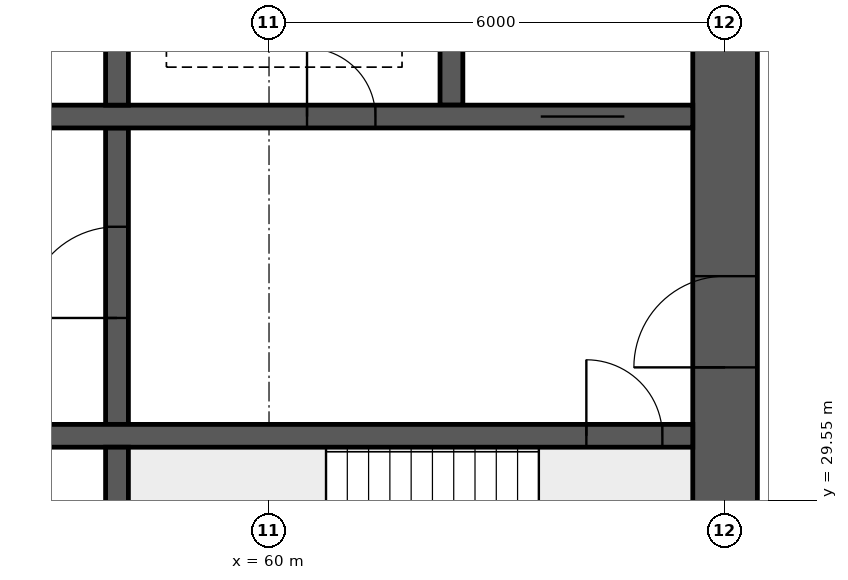
"""IFC4 building model, lengths in metres.
Left out: names, types, materials, properties, quantities, classifications, styles, units other than length and angle.
Written with IfcOpenShell. Run it as: python <this file> out.ifc"""

import sys

from ifc_helpers import new_model, si_unit, direction, frame, frame_2d, origin, place, context, subcontext, project, spatial, rectangle, extrude, element, fill, save


model = new_model("IFC4")
c1 = context("Model", 3, precision=1e-05, world=origin(), true_north=direction((0.0, 1.0)))
c2 = subcontext(c1, "Body", "Model", "MODEL_VIEW")
j1 = project(units=[si_unit("LENGTHUNIT", "METRE"), si_unit("PLANEANGLEUNIT", "RADIAN")], contexts=[c1])
p1 = place(None, origin())
s1 = spatial("IfcSite", under=j1, at=p1, CompositionType="ELEMENT")
p2 = place(p1, origin())
s2 = spatial("IfcBuilding", under=s1, at=p2, CompositionType="ELEMENT")
p3 = place(p2, frame((0.0, 0.0, 156.1)))
s3 = spatial("IfcBuildingStorey", under=s2, at=p3, CompositionType="ELEMENT", Elevation=156.1)
p4 = place(p3, frame((66.0, 26.225, 0.0), z_axis=(0.0, 0.0, 1.0), x_axis=(0.0, 1.0, 0.0)))
e1 = element("IfcWall", 1, at=p4, inside=s3, PredefinedType="SHEAR", context=c2, shape_type="SweptSolid", body=[
    extrude(rectangle(XDim=11.55, YDim=0.85, at=frame_2d((5.775, 0.0))), origin(), (0.0, 0.0, 1.0), 3.75),
])
p5 = place(p4, frame((5.075, 0.0, 0.0)))
e2 = element("IfcOpeningElement", 2, at=p5, cuts=e1, PredefinedType="OPENING", context=c2, shape_type="SweptSolid", body=[
    extrude(rectangle(XDim=1.2, YDim=2.1, at=frame_2d((0.6, 1.05))), frame((0.0, 0.435, 0.0), z_axis=(0.0, -1.0, 0.0), x_axis=(1.0, 0.0, 0.0)), (0.0, 0.0, 1.0), 0.87),
])
p6 = place(p3, frame((18.425, 30.4, 0.0), z_axis=(0.0, 0.0, 1.0), x_axis=(1.0, 0.0, 0.0)))
e3 = element("IfcWall", 3, at=p6, inside=s3, PredefinedType="SHEAR", context=c2, shape_type="SweptSolid", body=[
    extrude(rectangle(XDim=47.15, YDim=0.3, at=frame_2d((23.575, 0.0))), origin(), (0.0, 0.0, 1.0), 3.75),
])
p7 = place(p6, frame((0.4, 0.0, 0.0)))
e4 = element("IfcOpeningElement", 4, at=p7, cuts=e3, PredefinedType="OPENING", context=c2, shape_type="SweptSolid", body=[
    extrude(rectangle(XDim=1.0, YDim=2.1, at=frame_2d((0.5, 1.05))), frame((0.0, 0.16, 0.0), z_axis=(0.0, -1.0, 0.0), x_axis=(1.0, 0.0, 0.0)), (0.0, 0.0, 1.0), 0.32),
])
p8 = place(p6, frame((45.75, 0.0, 0.0)))
e5 = element("IfcOpeningElement", 5, at=p8, cuts=e3, PredefinedType="OPENING", context=c2, shape_type="SweptSolid", body=[
    extrude(rectangle(XDim=1.0, YDim=2.1, at=frame_2d((0.5, 1.05))), frame((0.0, 0.16, 0.0), z_axis=(0.0, -1.0, 0.0), x_axis=(1.0, 0.0, 0.0)), (0.0, 0.0, 1.0), 0.32),
])
p9 = place(p6, frame((8.325, 0.0, 0.0)))
e6 = element("IfcOpeningElement", 6, at=p9, cuts=e3, PredefinedType="OPENING", context=c2, shape_type="SweptSolid", body=[
    extrude(rectangle(XDim=1.1, YDim=2.1, at=frame_2d((0.55, 1.05))), frame((0.0, 0.16, 0.0), z_axis=(0.0, -1.0, 0.0), x_axis=(1.0, 0.0, 0.0)), (0.0, 0.0, 1.0), 0.32),
])
p10 = place(p6, frame((10.925, 0.0, 0.0)))
e7 = element("IfcOpeningElement", 7, at=p10, cuts=e3, PredefinedType="OPENING", context=c2, shape_type="SweptSolid", body=[
    extrude(rectangle(XDim=1.1, YDim=2.1, at=frame_2d((0.55, 1.05))), frame((0.0, 0.16, 0.0), z_axis=(0.0, -1.0, 0.0), x_axis=(1.0, 0.0, 0.0)), (0.0, 0.0, 1.0), 0.32),
])
p11 = place(p6, frame((13.525, 0.0, 0.0)))
e8 = element("IfcOpeningElement", 8, at=p11, cuts=e3, PredefinedType="OPENING", context=c2, shape_type="SweptSolid", body=[
    extrude(rectangle(XDim=1.1, YDim=2.1, at=frame_2d((0.55, 1.05))), frame((0.0, 0.16, 0.0), z_axis=(0.0, -1.0, 0.0), x_axis=(1.0, 0.0, 0.0)), (0.0, 0.0, 1.0), 0.32),
])
p12 = place(p6, frame((16.125, 0.0, 0.0)))
e9 = element("IfcOpeningElement", 9, at=p12, cuts=e3, PredefinedType="OPENING", context=c2, shape_type="SweptSolid", body=[
    extrude(rectangle(XDim=1.1, YDim=2.1, at=frame_2d((0.55, 1.05))), frame((0.0, 0.16, 0.0), z_axis=(0.0, -1.0, 0.0), x_axis=(1.0, 0.0, 0.0)), (0.0, 0.0, 1.0), 0.32),
])
p13 = place(p6, frame((18.9, 0.0, 0.0)))
e10 = element("IfcOpeningElement", 10, at=p13, cuts=e3, PredefinedType="OPENING", context=c2, shape_type="SweptSolid", body=[
    extrude(rectangle(XDim=0.9, YDim=2.1, at=frame_2d((0.45, 1.05))), frame((0.0, 0.16, 0.0), z_axis=(0.0, -1.0, 0.0), x_axis=(1.0, 0.0, 0.0)), (0.0, 0.0, 1.0), 0.32),
])
p14 = place(p6, frame((30.192, 0.0, 0.0)))
e11 = element("IfcOpeningElement", 11, at=p14, cuts=e3, PredefinedType="OPENING", context=c2, shape_type="SweptSolid", body=[
    extrude(rectangle(XDim=1.1, YDim=2.1, at=frame_2d((0.55, 1.05))), frame((0.0, 0.16, 0.0), z_axis=(0.0, -1.0, 0.0), x_axis=(1.0, 0.0, 0.0)), (0.0, 0.0, 1.0), 0.32),
])
p15 = place(p6, frame((33.725, 0.0, 0.0)))
e12 = element("IfcOpeningElement", 12, at=p15, cuts=e3, PredefinedType="OPENING", context=c2, shape_type="SweptSolid", body=[
    extrude(rectangle(XDim=1.1, YDim=2.1, at=frame_2d((0.55, 1.05))), frame((0.0, 0.16, 0.0), z_axis=(0.0, -1.0, 0.0), x_axis=(1.0, 0.0, 0.0)), (0.0, 0.0, 1.0), 0.32),
])
p16 = place(p6, frame((37.258, 0.0, 0.0)))
e13 = element("IfcOpeningElement", 13, at=p16, cuts=e3, PredefinedType="OPENING", context=c2, shape_type="SweptSolid", body=[
    extrude(rectangle(XDim=1.1, YDim=2.1, at=frame_2d((0.55, 1.05))), frame((0.0, 0.16, 0.0), z_axis=(0.0, -1.0, 0.0), x_axis=(1.0, 0.0, 0.0)), (0.0, 0.0, 1.0), 0.32),
])
p17 = place(p3, frame((18.425, 34.6, 0.0), z_axis=(0.0, 0.0, 1.0), x_axis=(1.0, 0.0, 0.0)))
e14 = element("IfcWall", 14, at=p17, inside=s3, PredefinedType="SHEAR", context=c2, shape_type="SweptSolid", body=[
    extrude(rectangle(XDim=47.15, YDim=0.3, at=frame_2d((23.575, 0.0))), origin(), (0.0, 0.0, 1.0), 3.75),
])
p18 = place(p17, frame((0.9, 0.0, 0.0)))
e15 = element("IfcOpeningElement", 15, at=p18, cuts=e14, PredefinedType="OPENING", context=c2, shape_type="SweptSolid", body=[
    extrude(rectangle(XDim=1.1, YDim=2.1, at=frame_2d((0.55, 1.05))), frame((0.0, 0.16, 0.0), z_axis=(0.0, -1.0, 0.0), x_axis=(1.0, 0.0, 0.0)), (0.0, 0.0, 1.0), 0.32),
])
p19 = place(p17, frame((45.15, 0.0, 0.0)))
e16 = element("IfcOpeningElement", 16, at=p19, cuts=e14, PredefinedType="OPENING", context=c2, shape_type="SweptSolid", body=[
    extrude(rectangle(XDim=1.1, YDim=2.1, at=frame_2d((0.55, 1.05))), frame((0.0, 0.16, 0.0), z_axis=(0.0, -1.0, 0.0), x_axis=(1.0, 0.0, 0.0)), (0.0, 0.0, 1.0), 0.32),
])
p20 = place(p17, frame((4.175, 0.0, 0.0)))
e17 = element("IfcOpeningElement", 17, at=p20, cuts=e14, PredefinedType="OPENING", context=c2, shape_type="SweptSolid", body=[
    extrude(rectangle(XDim=0.9, YDim=2.1, at=frame_2d((0.45, 1.05))), frame((0.0, 0.16, 0.0), z_axis=(0.0, -1.0, 0.0), x_axis=(1.0, 0.0, 0.0)), (0.0, 0.0, 1.0), 0.32),
])
p21 = place(p17, frame((42.075, 0.0, 0.0)))
e18 = element("IfcOpeningElement", 18, at=p21, cuts=e14, PredefinedType="OPENING", context=c2, shape_type="SweptSolid", body=[
    extrude(rectangle(XDim=0.9, YDim=2.1, at=frame_2d((0.45, 1.05))), frame((0.0, 0.16, 0.0), z_axis=(0.0, -1.0, 0.0), x_axis=(1.0, 0.0, 0.0)), (0.0, 0.0, 1.0), 0.32),
])
p22 = place(p17, frame((8.95, 0.0, 0.0)))
e19 = element("IfcOpeningElement", 19, at=p22, cuts=e14, PredefinedType="OPENING", context=c2, shape_type="SweptSolid", body=[
    extrude(rectangle(XDim=0.9, YDim=2.1, at=frame_2d((0.45, 1.05))), frame((0.0, 0.16, 0.0), z_axis=(0.0, -1.0, 0.0), x_axis=(1.0, 0.0, 0.0)), (0.0, 0.0, 1.0), 0.32),
])
p23 = place(p17, frame((12.924, 0.0, 0.0)))
e20 = element("IfcOpeningElement", 20, at=p23, cuts=e14, PredefinedType="OPENING", context=c2, shape_type="SweptSolid", body=[
    extrude(rectangle(XDim=0.9, YDim=2.1, at=frame_2d((0.45, 1.05))), frame((0.0, 0.16, 0.0), z_axis=(0.0, -1.0, 0.0), x_axis=(1.0, 0.0, 0.0)), (0.0, 0.0, 1.0), 0.32),
])
p24 = place(p17, frame((16.571, 0.0, 0.0)))
e21 = element("IfcOpeningElement", 21, at=p24, cuts=e14, PredefinedType="OPENING", context=c2, shape_type="SweptSolid", body=[
    extrude(rectangle(XDim=0.9, YDim=2.1, at=frame_2d((0.45, 1.05))), frame((0.0, 0.16, 0.0), z_axis=(0.0, -1.0, 0.0), x_axis=(1.0, 0.0, 0.0)), (0.0, 0.0, 1.0), 0.32),
])
p25 = place(p17, frame((20.33, 0.0, 0.0)))
e22 = element("IfcOpeningElement", 22, at=p25, cuts=e14, PredefinedType="OPENING", context=c2, shape_type="SweptSolid", body=[
    extrude(rectangle(XDim=0.9, YDim=2.1, at=frame_2d((0.45, 1.05))), frame((0.0, 0.16, 0.0), z_axis=(0.0, -1.0, 0.0), x_axis=(1.0, 0.0, 0.0)), (0.0, 0.0, 1.0), 0.32),
])
p26 = place(p17, frame((24.736, 0.0, 0.0)))
e23 = element("IfcOpeningElement", 23, at=p26, cuts=e14, PredefinedType="OPENING", context=c2, shape_type="SweptSolid", body=[
    extrude(rectangle(XDim=0.9, YDim=2.1, at=frame_2d((0.45, 1.05))), frame((0.0, 0.16, 0.0), z_axis=(0.0, -1.0, 0.0), x_axis=(1.0, 0.0, 0.0)), (0.0, 0.0, 1.0), 0.32),
])
p27 = place(p17, frame((27.533, 0.0, 0.0)))
e24 = element("IfcOpeningElement", 24, at=p27, cuts=e14, PredefinedType="OPENING", context=c2, shape_type="SweptSolid", body=[
    extrude(rectangle(XDim=0.9, YDim=2.1, at=frame_2d((0.45, 1.05))), frame((0.0, 0.16, 0.0), z_axis=(0.0, -1.0, 0.0), x_axis=(1.0, 0.0, 0.0)), (0.0, 0.0, 1.0), 0.32),
])
p28 = place(p17, frame((29.906, 0.0, 0.0)))
e25 = element("IfcOpeningElement", 25, at=p28, cuts=e14, PredefinedType="OPENING", context=c2, shape_type="SweptSolid", body=[
    extrude(rectangle(XDim=0.9, YDim=2.1, at=frame_2d((0.45, 1.05))), frame((0.0, 0.16, 0.0), z_axis=(0.0, -1.0, 0.0), x_axis=(1.0, 0.0, 0.0)), (0.0, 0.0, 1.0), 0.32),
])
p29 = place(p17, frame((35.376, 0.0, 0.0)))
e26 = element("IfcOpeningElement", 26, at=p29, cuts=e14, PredefinedType="OPENING", context=c2, shape_type="SweptSolid", body=[
    extrude(rectangle(XDim=0.9, YDim=2.1, at=frame_2d((0.45, 1.05))), frame((0.0, 0.16, 0.0), z_axis=(0.0, -1.0, 0.0), x_axis=(1.0, 0.0, 0.0)), (0.0, 0.0, 1.0), 0.32),
])
p30 = place(p3, frame((58.0, 26.225, 0.0), z_axis=(0.0, 0.0, 1.0), x_axis=(0.0, 1.0, 0.0)))
e27 = element("IfcWall", 27, at=p30, inside=s3, PredefinedType="SHEAR", context=c2, shape_type="SweptSolid", body=[
    extrude(rectangle(XDim=4.025, YDim=0.3, at=frame_2d((2.012, 0.0))), origin(), (0.0, 0.0, 1.0), 3.75),
])
p31 = place(p3, frame((58.0, 30.55, 0.0), z_axis=(0.0, 0.0, 1.0), x_axis=(0.0, 1.0, 0.0)))
e28 = element("IfcWall", 28, at=p31, inside=s3, PredefinedType="SHEAR", context=c2, shape_type="SweptSolid", body=[
    extrude(rectangle(XDim=3.9, YDim=0.3, at=frame_2d((1.95, 0.0))), origin(), (0.0, 0.0, 1.0), 3.75),
])
p32 = place(p31, frame((1.4, 0.0, 0.0)))
e29 = element("IfcOpeningElement", 29, at=p32, cuts=e28, PredefinedType="OPENING", context=c2, shape_type="SweptSolid", body=[
    extrude(rectangle(XDim=1.2, YDim=2.1, at=frame_2d((0.6, 1.05))), frame((0.0, 0.16, 0.0), z_axis=(0.0, -1.0, 0.0), x_axis=(1.0, 0.0, 0.0)), (0.0, 0.0, 1.0), 0.32),
])
for number, where, z_axis, x_axis in (
    (30, (62.4, 34.75, 0.0), (0.0, 0.0, 1.0), (0.0, 1.0, 0.0)),
    (31, (58.0, 34.75, 0.0), (0.0, 0.0, 1.0), (0.0, 1.0, 0.0)),
):
    element("IfcWall", number, at=place(p3, frame(where, z_axis=z_axis, x_axis=x_axis)), inside=s3, PredefinedType="SHEAR", context=c2, shape_type="SweptSolid", body=[
        extrude(rectangle(XDim=3.025, YDim=0.3, at=frame_2d((1.512, 0.0))), origin(), (0.0, 0.0, 1.0), 3.75),
    ])
p33 = place(p5, origin())
e32 = element("IfcDoor", 32, at=p33, inside=s3, OperationType="SINGLE_SWING_LEFT", PredefinedType="DOOR", context=c2, shape_type="SweptSolid", body=[
    extrude(rectangle(XDim=1.2, YDim=2.1, at=frame_2d((0.6, 1.05))), frame((0.0, 0.025, 0.0), z_axis=(0.0, -1.0, 0.0), x_axis=(1.0, 0.0, 0.0)), (0.0, 0.0, 1.0), 0.05),
])
fill(e2, e32)
p34 = place(p8, origin())
e33 = element("IfcDoor", 33, at=p34, inside=s3, OperationType="SINGLE_SWING_LEFT", PredefinedType="DOOR", context=c2, shape_type="SweptSolid", body=[
    extrude(rectangle(XDim=1.0, YDim=2.1, at=frame_2d((0.5, 1.05))), frame((0.0, 0.025, 0.0), z_axis=(0.0, -1.0, 0.0), x_axis=(1.0, 0.0, 0.0)), (0.0, 0.0, 1.0), 0.05),
])
fill(e5, e33)
p35 = place(p19, origin())
e34 = element("IfcDoor", 34, at=p35, inside=s3, OperationType="DOUBLE_DOOR_SLIDING", PredefinedType="DOOR", context=c2, shape_type="SweptSolid", body=[
    extrude(rectangle(XDim=1.1, YDim=2.1, at=frame_2d((0.55, 1.05))), frame((0.0, 0.025, 0.0), z_axis=(0.0, -1.0, 0.0), x_axis=(1.0, 0.0, 0.0)), (0.0, 0.0, 1.0), 0.05),
])
fill(e16, e34)
p36 = place(p21, origin())
e35 = element("IfcDoor", 35, at=p36, inside=s3, OperationType="SINGLE_SWING_LEFT", PredefinedType="DOOR", context=c2, shape_type="SweptSolid", body=[
    extrude(rectangle(XDim=0.9, YDim=2.1, at=frame_2d((0.45, 1.05))), frame((0.0, 0.025, 0.0), z_axis=(0.0, -1.0, 0.0), x_axis=(1.0, 0.0, 0.0)), (0.0, 0.0, 1.0), 0.05),
])
fill(e18, e35)
p37 = place(p32, origin())
e36 = element("IfcDoor", 36, at=p37, inside=s3, OperationType="SINGLE_SWING_LEFT", PredefinedType="DOOR", context=c2, shape_type="SweptSolid", body=[
    extrude(rectangle(XDim=1.2, YDim=2.1, at=frame_2d((0.6, 1.05))), frame((0.0, 0.025, 0.0), z_axis=(0.0, -1.0, 0.0), x_axis=(1.0, 0.0, 0.0)), (0.0, 0.0, 1.0), 0.05),
])
fill(e29, e36)
save(model, sys.argv[1])
